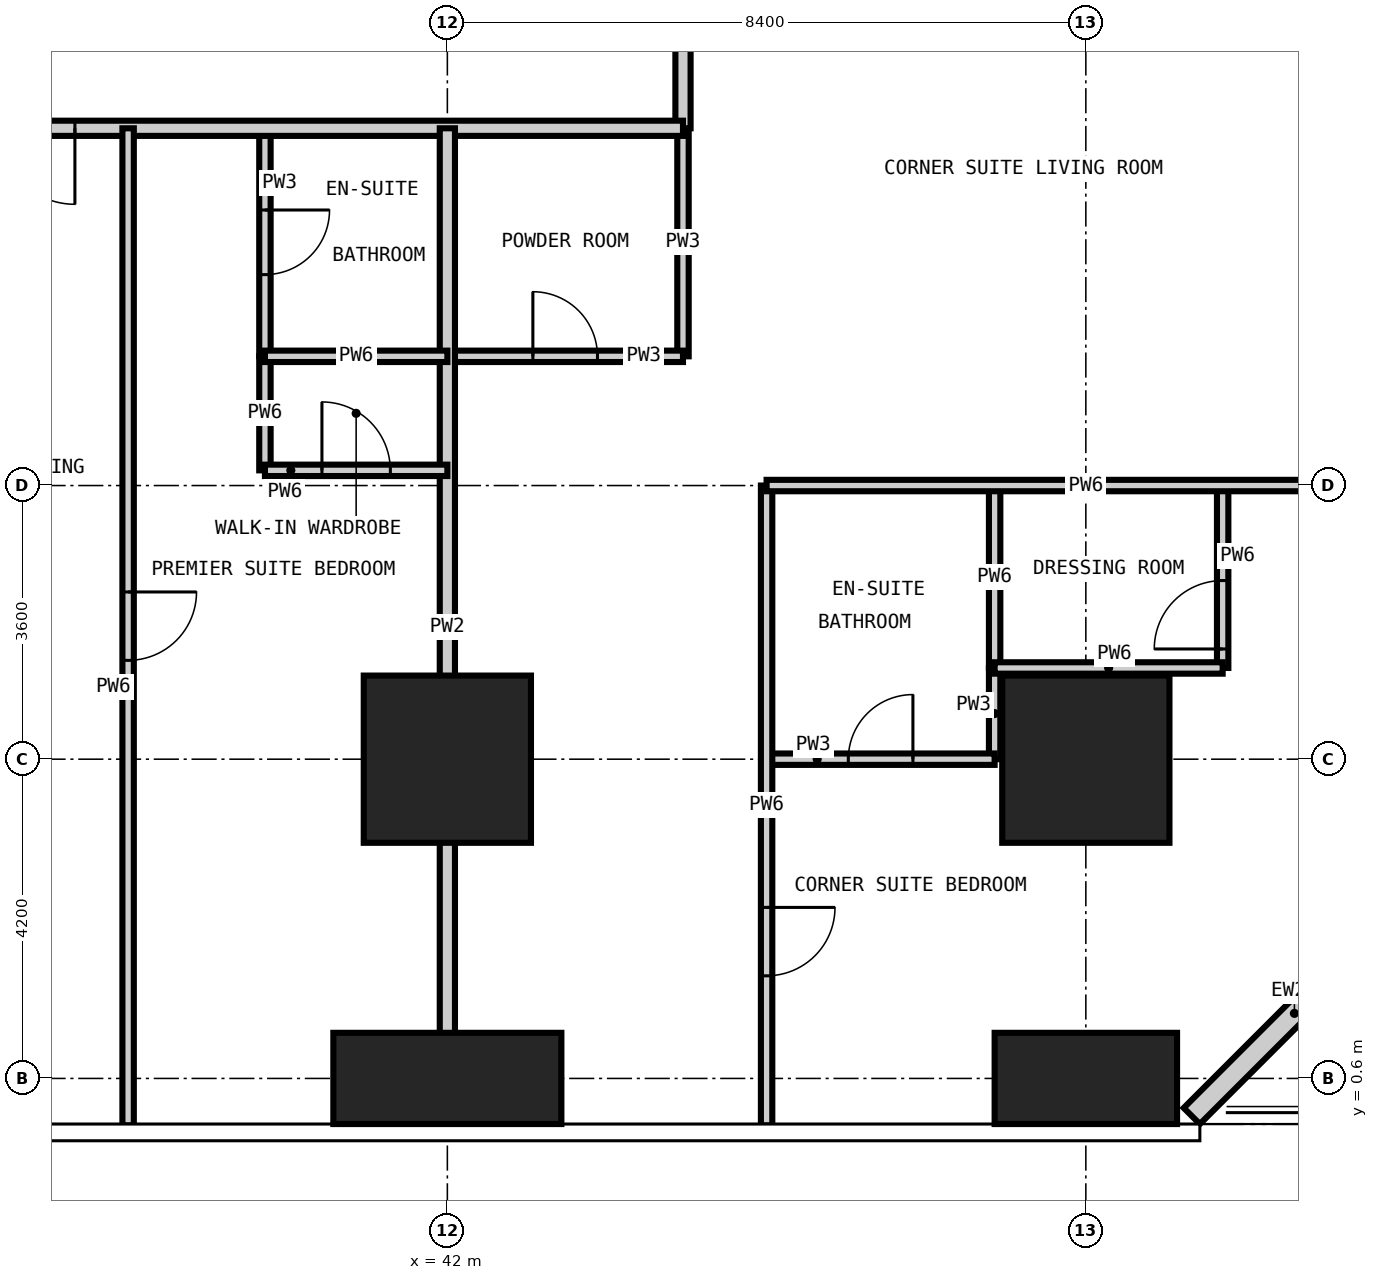
"""IFC4 building model, lengths in metres.
Left out: names, types, materials, properties, quantities, classifications, styles, units other than length and angle.
Written with IfcOpenShell. Run it as: python <this file> out.ifc"""

import sys

from ifc_helpers import new_model, si_unit, direction, frame, frame_2d, origin, origin_2d, place, context, subcontext, project, spatial, rectangle, extrude, element, fill, save


model = new_model("IFC4")
c1 = context("Model", 3, precision=1e-05, world=origin(), true_north=direction((0.0, 1.0)))
c2 = subcontext(c1, "Body", "Model", "MODEL_VIEW")
j1 = project(units=[si_unit("LENGTHUNIT", "METRE"), si_unit("PLANEANGLEUNIT", "RADIAN")], contexts=[c1])
p1 = place(None, origin())
s1 = spatial("IfcSite", under=j1, at=p1, CompositionType="ELEMENT")
p2 = place(p1, origin())
s2 = spatial("IfcBuilding", under=s1, at=p2, CompositionType="ELEMENT")
p3 = place(p2, frame((0.0, 0.0, 93.6)))
s3 = spatial("IfcBuildingStorey", under=s2, at=p3, CompositionType="ELEMENT", Elevation=93.6)
p4 = place(p3, frame((42.0, 0.6, -0.35), z_axis=(0.0, 0.0, 1.0), x_axis=(1.0, 0.0, 0.0)))
e1 = element("IfcColumn", 1, at=p4, inside=s3, PredefinedType="COLUMN", context=c2, shape_type="SweptSolid", body=[
    extrude(rectangle(XDim=3.0, YDim=1.2, at=origin_2d()), origin(), (0.0, 0.0, 1.0), 3.6),
])
p5 = place(p3, frame((42.0, 4.8, -0.35), z_axis=(0.0, 0.0, 1.0), x_axis=(1.0, 0.0, 0.0)))
e2 = element("IfcColumn", 2, at=p5, inside=s3, PredefinedType="COLUMN", context=c2, shape_type="SweptSolid", body=[
    extrude(rectangle(XDim=2.2, YDim=2.2, at=origin_2d()), origin(), (0.0, 0.0, 1.0), 3.6),
])
p6 = place(p3, frame((50.4, 0.6, -0.35), z_axis=(0.0, 0.0, 1.0), x_axis=(1.0, 0.0, 0.0)))
e3 = element("IfcColumn", 3, at=p6, inside=s3, PredefinedType="COLUMN", context=c2, shape_type="SweptSolid", body=[
    extrude(rectangle(XDim=2.4, YDim=1.2, at=origin_2d()), origin(), (0.0, 0.0, 1.0), 3.6),
])
p7 = place(p3, frame((50.4, 4.8, -0.35), z_axis=(0.0, 0.0, 1.0), x_axis=(1.0, 0.0, 0.0)))
e4 = element("IfcColumn", 4, at=p7, inside=s3, PredefinedType="COLUMN", context=c2, shape_type="SweptSolid", body=[
    extrude(rectangle(XDim=2.2, YDim=2.2, at=origin_2d()), origin(), (0.0, 0.0, 1.0), 3.6),
])
p8 = place(p3, frame((51.794, 0.106, 0.0), z_axis=(0.0, 0.0, 1.0), x_axis=(0.707106781187, 0.707106781187, 0.0)))
e5 = element("IfcWall", 5, at=p8, inside=s3, PredefinedType="SOLIDWALL", context=c2, shape_type="SweptSolid", body=[
    extrude(rectangle(XDim=3.818, YDim=0.3, at=frame_2d((1.909, 0.0))), origin(), (0.0, 0.0, 1.0), 3.25),
])
p9 = place(p3, frame((39.6, 10.1, 0.0), z_axis=(0.0, 0.0, 1.0), x_axis=(0.0, 1.0, 0.0)))
e6 = element("IfcWall", 6, at=p9, inside=s3, PredefinedType="PARTITIONING", context=c2, shape_type="SweptSolid", body=[
    extrude(rectangle(XDim=3.0, YDim=0.15, at=frame_2d((1.5, 0.0))), origin(), (0.0, 0.0, 1.0), 3.25),
])
p10 = place(p9, frame((1.075, 0.0, 0.0)))
e7 = element("IfcOpeningElement", 7, at=p10, cuts=e6, PredefinedType="OPENING", context=c2, shape_type="SweptSolid", body=[
    extrude(rectangle(XDim=0.85, YDim=2.1, at=frame_2d((0.425, 1.05))), frame((0.0, 0.085, 0.0), z_axis=(0.0, -1.0, 0.0), x_axis=(1.0, 0.0, 0.0)), (0.0, 0.0, 1.0), 0.17),
])
p11 = place(p3, frame((45.1, 10.1, 0.0), z_axis=(0.0, 0.0, 1.0), x_axis=(0.0, 1.0, 0.0)))
e8 = element("IfcWall", 8, at=p11, inside=s3, PredefinedType="PARTITIONING", context=c2, shape_type="SweptSolid", body=[
    extrude(rectangle(XDim=3.0, YDim=0.15, at=frame_2d((1.5, 0.0))), origin(), (0.0, 0.0, 1.0), 3.25),
])
p12 = place(p3, frame((49.2, 4.8, 0.0), z_axis=(0.0, 0.0, 1.0), x_axis=(0.0, 1.0, 0.0)))
e9 = element("IfcWall", 9, at=p12, inside=s3, PredefinedType="PARTITIONING", context=c2, shape_type="SweptSolid", body=[
    extrude(rectangle(XDim=1.2, YDim=0.15, at=frame_2d((0.6, 0.0))), origin(), (0.0, 0.0, 1.0), 3.25),
])
p13 = place(p3, frame((46.2, 4.8, 0.0), z_axis=(0.0, 0.0, 1.0), x_axis=(1.0, 0.0, 0.0)))
e10 = element("IfcWall", 10, at=p13, inside=s3, PredefinedType="PARTITIONING", context=c2, shape_type="SweptSolid", body=[
    extrude(rectangle(XDim=3.0, YDim=0.15, at=frame_2d((1.5, 0.0))), origin(), (0.0, 0.0, 1.0), 3.25),
])
p14 = place(p13, frame((1.075, 0.0, 0.0)))
e11 = element("IfcOpeningElement", 11, at=p14, cuts=e10, PredefinedType="OPENING", context=c2, shape_type="SweptSolid", body=[
    extrude(rectangle(XDim=0.85, YDim=2.1, at=frame_2d((0.425, 1.05))), frame((0.0, 0.085, 0.0), z_axis=(0.0, -1.0, 0.0), x_axis=(1.0, 0.0, 0.0)), (0.0, 0.0, 1.0), 0.17),
])
p15 = place(p3, frame((42.0, 10.1, 0.0), z_axis=(0.0, 0.0, 1.0), x_axis=(1.0, 0.0, 0.0)))
e12 = element("IfcWall", 12, at=p15, inside=s3, PredefinedType="PARTITIONING", context=c2, shape_type="SweptSolid", body=[
    extrude(rectangle(XDim=3.1, YDim=0.15, at=frame_2d((1.55, 0.0))), origin(), (0.0, 0.0, 1.0), 3.25),
])
p16 = place(p15, frame((1.125, 0.0, 0.0)))
e13 = element("IfcOpeningElement", 13, at=p16, cuts=e12, PredefinedType="OPENING", context=c2, shape_type="SweptSolid", body=[
    extrude(rectangle(XDim=0.85, YDim=2.1, at=frame_2d((0.425, 1.05))), frame((0.0, 0.085, 0.0), z_axis=(0.0, -1.0, 0.0), x_axis=(1.0, 0.0, 0.0)), (0.0, 0.0, 1.0), 0.17),
])
p17 = place(p3, frame((45.1, 44.5, 0.0), z_axis=(0.0, 0.0, 1.0), x_axis=(0.0, -1.0, 0.0)))
e14 = element("IfcWall", 14, at=p17, inside=s3, PredefinedType="PARTITIONING", context=c2, shape_type="SweptSolid", body=[
    extrude(rectangle(XDim=31.4, YDim=0.2, at=frame_2d((15.7, 0.0))), origin(), (0.0, 0.0, 1.0), 3.25),
])
p18 = place(p17, frame((21.65, 0.0, 0.0)))
e15 = element("IfcOpeningElement", 15, at=p18, cuts=e14, PredefinedType="OPENING", context=c2, shape_type="SweptSolid", body=[
    extrude(rectangle(XDim=1.0, YDim=2.2, at=frame_2d((0.5, 1.1))), frame((0.0, 0.11, 0.0), z_axis=(0.0, -1.0, 0.0), x_axis=(1.0, 0.0, 0.0)), (0.0, 0.0, 1.0), 0.22),
])
p19 = place(p17, frame((15.95, 0.0, 0.0)))
e16 = element("IfcOpeningElement", 16, at=p19, cuts=e14, PredefinedType="OPENING", context=c2, shape_type="SweptSolid", body=[
    extrude(rectangle(XDim=1.0, YDim=2.2, at=frame_2d((0.5, 1.1))), frame((0.0, 0.11, 0.0), z_axis=(0.0, -1.0, 0.0), x_axis=(1.0, 0.0, 0.0)), (0.0, 0.0, 1.0), 0.22),
])
p20 = place(p17, frame((4.85, 0.0, 0.0)))
e17 = element("IfcOpeningElement", 17, at=p20, cuts=e14, PredefinedType="OPENING", context=c2, shape_type="SweptSolid", body=[
    extrude(rectangle(XDim=1.0, YDim=2.2, at=frame_2d((0.5, 1.1))), frame((0.0, 0.11, 0.0), z_axis=(0.0, -1.0, 0.0), x_axis=(1.0, 0.0, 0.0)), (0.0, 0.0, 1.0), 0.22),
])
p21 = place(p17, frame((29.05, 0.0, 0.0)))
e18 = element("IfcOpeningElement", 18, at=p21, cuts=e14, PredefinedType="OPENING", context=c2, shape_type="SweptSolid", body=[
    extrude(rectangle(XDim=1.0, YDim=2.2, at=frame_2d((0.5, 1.1))), frame((0.0, 0.11, 0.0), z_axis=(0.0, -1.0, 0.0), x_axis=(1.0, 0.0, 0.0)), (0.0, 0.0, 1.0), 0.22),
])
p22 = place(p17, frame((0.75, 0.0, 0.0)))
e19 = element("IfcOpeningElement", 19, at=p22, cuts=e14, PredefinedType="OPENING", context=c2, shape_type="SweptSolid", body=[
    extrude(rectangle(XDim=1.0, YDim=2.2, at=frame_2d((0.5, 1.1))), frame((0.0, 0.11, 0.0), z_axis=(0.0, -1.0, 0.0), x_axis=(1.0, 0.0, 0.0)), (0.0, 0.0, 1.0), 0.22),
])
p23 = place(p3, frame((45.1, 13.1, 0.0), z_axis=(0.0, 0.0, 1.0), x_axis=(-1.0, 0.0, 0.0)))
e20 = element("IfcWall", 20, at=p23, inside=s3, PredefinedType="PARTITIONING", context=c2, shape_type="SweptSolid", body=[
    extrude(rectangle(XDim=32.5, YDim=0.2, at=frame_2d((16.25, 0.0))), origin(), (0.0, 0.0, 1.0), 3.25),
])
p24 = place(p23, frame((24.8, 0.0, 0.0)))
e21 = element("IfcOpeningElement", 21, at=p24, cuts=e20, PredefinedType="OPENING", context=c2, shape_type="SweptSolid", body=[
    extrude(rectangle(XDim=1.0, YDim=2.2, at=frame_2d((0.5, 1.1))), frame((0.0, 0.11, 0.0), z_axis=(0.0, -1.0, 0.0), x_axis=(1.0, 0.0, 0.0)), (0.0, 0.0, 1.0), 0.22),
])
p25 = place(p23, frame((14.0, 0.0, 0.0)))
e22 = element("IfcOpeningElement", 22, at=p25, cuts=e20, PredefinedType="OPENING", context=c2, shape_type="SweptSolid", body=[
    extrude(rectangle(XDim=1.0, YDim=2.2, at=frame_2d((0.5, 1.1))), frame((0.0, 0.11, 0.0), z_axis=(0.0, -1.0, 0.0), x_axis=(1.0, 0.0, 0.0)), (0.0, 0.0, 1.0), 0.22),
])
p26 = place(p23, frame((8.0, 0.0, 0.0)))
e23 = element("IfcOpeningElement", 23, at=p26, cuts=e20, PredefinedType="OPENING", context=c2, shape_type="SweptSolid", body=[
    extrude(rectangle(XDim=1.0, YDim=2.2, at=frame_2d((0.5, 1.1))), frame((0.0, 0.11, 0.0), z_axis=(0.0, -1.0, 0.0), x_axis=(1.0, 0.0, 0.0)), (0.0, 0.0, 1.0), 0.22),
])
p27 = place(p3, frame((42.0, -0.018, 0.0), z_axis=(0.0, 0.0, 1.0), x_axis=(0.0, 1.0, 0.0)))
e24 = element("IfcWall", 24, at=p27, inside=s3, PredefinedType="PARTITIONING", context=c2, shape_type="SweptSolid", body=[
    extrude(rectangle(XDim=13.118, YDim=0.2, at=frame_2d((6.559, 0.0))), origin(), (0.0, 0.0, 1.0), 3.25),
])
p28 = place(p3, frame((37.8, -0.018, 0.0), z_axis=(0.0, 0.0, 1.0), x_axis=(0.0, 1.0, 0.0)))
e25 = element("IfcWall", 25, at=p28, inside=s3, PredefinedType="PARTITIONING", context=c2, shape_type="SweptSolid", body=[
    extrude(rectangle(XDim=13.118, YDim=0.15, at=frame_2d((6.559, 0.0))), origin(), (0.0, 0.0, 1.0), 3.25),
])
p29 = place(p28, frame((6.118, 0.0, 0.0)))
e26 = element("IfcOpeningElement", 26, at=p29, cuts=e25, PredefinedType="OPENING", context=c2, shape_type="SweptSolid", body=[
    extrude(rectangle(XDim=0.9, YDim=2.1, at=frame_2d((0.45, 1.05))), frame((0.0, 0.085, 0.0), z_axis=(0.0, -1.0, 0.0), x_axis=(1.0, 0.0, 0.0)), (0.0, 0.0, 1.0), 0.17),
])
p30 = place(p3, frame((39.6, 8.6, 0.0), z_axis=(0.0, 0.0, 1.0), x_axis=(0.0, 1.0, 0.0)))
e27 = element("IfcWall", 27, at=p30, inside=s3, PredefinedType="PARTITIONING", context=c2, shape_type="SweptSolid", body=[
    extrude(rectangle(XDim=1.5, YDim=0.15, at=frame_2d((0.75, 0.0))), origin(), (0.0, 0.0, 1.0), 3.25),
])
p31 = place(p3, frame((46.2, -0.018, 0.0), z_axis=(0.0, 0.0, 1.0), x_axis=(0.0, 1.0, 0.0)))
e28 = element("IfcWall", 28, at=p31, inside=s3, PredefinedType="PARTITIONING", context=c2, shape_type="SweptSolid", body=[
    extrude(rectangle(XDim=8.418, YDim=0.15, at=frame_2d((4.209, 0.0))), origin(), (0.0, 0.0, 1.0), 3.25),
])
p32 = place(p31, frame((1.968, 0.0, 0.0)))
e29 = element("IfcOpeningElement", 29, at=p32, cuts=e28, PredefinedType="OPENING", context=c2, shape_type="SweptSolid", body=[
    extrude(rectangle(XDim=0.9, YDim=2.1, at=frame_2d((0.45, 1.05))), frame((0.0, 0.085, 0.0), z_axis=(0.0, -1.0, 0.0), x_axis=(1.0, 0.0, 0.0)), (0.0, 0.0, 1.0), 0.17),
])
p33 = place(p3, frame((49.2, 6.0, 0.0), z_axis=(0.0, 0.0, 1.0), x_axis=(0.0, 1.0, 0.0)))
e30 = element("IfcWall", 30, at=p33, inside=s3, PredefinedType="PARTITIONING", context=c2, shape_type="SweptSolid", body=[
    extrude(rectangle(XDim=2.4, YDim=0.15, at=frame_2d((1.2, 0.0))), origin(), (0.0, 0.0, 1.0), 3.25),
])
p34 = place(p3, frame((52.2, 6.0, 0.0), z_axis=(0.0, 0.0, 1.0), x_axis=(0.0, 1.0, 0.0)))
e31 = element("IfcWall", 31, at=p34, inside=s3, PredefinedType="PARTITIONING", context=c2, shape_type="SweptSolid", body=[
    extrude(rectangle(XDim=2.4, YDim=0.15, at=frame_2d((1.2, 0.0))), origin(), (0.0, 0.0, 1.0), 3.25),
])
p35 = place(p34, frame((0.25, 0.0, 0.0)))
e32 = element("IfcOpeningElement", 32, at=p35, cuts=e31, PredefinedType="OPENING", context=c2, shape_type="SweptSolid", body=[
    extrude(rectangle(XDim=0.9, YDim=2.1, at=frame_2d((0.45, 1.05))), frame((0.0, 0.085, 0.0), z_axis=(0.0, -1.0, 0.0), x_axis=(1.0, 0.0, 0.0)), (0.0, 0.0, 1.0), 0.17),
])
p36 = place(p3, frame((49.2, 6.0, 0.0), z_axis=(0.0, 0.0, 1.0), x_axis=(1.0, 0.0, 0.0)))
e33 = element("IfcWall", 33, at=p36, inside=s3, PredefinedType="PARTITIONING", context=c2, shape_type="SweptSolid", body=[
    extrude(rectangle(XDim=3.0, YDim=0.15, at=frame_2d((1.5, 0.0))), origin(), (0.0, 0.0, 1.0), 3.25),
])
p37 = place(p3, frame((46.2, 8.4, 0.0), z_axis=(0.0, 0.0, 1.0), x_axis=(1.0, 0.0, 0.0)))
e34 = element("IfcWall", 34, at=p37, inside=s3, PredefinedType="PARTITIONING", context=c2, shape_type="SweptSolid", body=[
    extrude(rectangle(XDim=8.4, YDim=0.15, at=frame_2d((4.2, 0.0))), origin(), (0.0, 0.0, 1.0), 3.25),
])
p38 = place(p3, frame((39.6, 8.6, 0.0), z_axis=(0.0, 0.0, 1.0), x_axis=(1.0, 0.0, 0.0)))
e35 = element("IfcWall", 35, at=p38, inside=s3, PredefinedType="PARTITIONING", context=c2, shape_type="SweptSolid", body=[
    extrude(rectangle(XDim=2.4, YDim=0.15, at=frame_2d((1.2, 0.0))), origin(), (0.0, 0.0, 1.0), 3.25),
])
p39 = place(p38, frame((0.75, 0.0, 0.0)))
e36 = element("IfcOpeningElement", 36, at=p39, cuts=e35, PredefinedType="OPENING", context=c2, shape_type="SweptSolid", body=[
    extrude(rectangle(XDim=0.9, YDim=2.1, at=frame_2d((0.45, 1.05))), frame((0.0, 0.085, 0.0), z_axis=(0.0, -1.0, 0.0), x_axis=(1.0, 0.0, 0.0)), (0.0, 0.0, 1.0), 0.17),
])
p40 = place(p3, frame((39.6, 10.1, 0.0), z_axis=(0.0, 0.0, 1.0), x_axis=(1.0, 0.0, 0.0)))
e37 = element("IfcWall", 37, at=p40, inside=s3, PredefinedType="PARTITIONING", context=c2, shape_type="SweptSolid", body=[
    extrude(rectangle(XDim=2.4, YDim=0.15, at=frame_2d((1.2, 0.0))), origin(), (0.0, 0.0, 1.0), 3.25),
])
p41 = place(p26, origin())
e38 = element("IfcDoor", 38, at=p41, inside=s3, OperationType="SINGLE_SWING_LEFT", PredefinedType="DOOR", context=c2, shape_type="SweptSolid", body=[
    extrude(rectangle(XDim=1.0, YDim=2.2, at=frame_2d((0.5, 1.1))), frame((0.0, 0.025, 0.0), z_axis=(0.0, -1.0, 0.0), x_axis=(1.0, 0.0, 0.0)), (0.0, 0.0, 1.0), 0.05),
])
fill(e23, e38)
p42 = place(p29, frame((0.9, 0.0, 0.0), z_axis=(0.0, 0.0, 1.0), x_axis=(-1.0, 0.0, 0.0)))
e39 = element("IfcDoor", 39, at=p42, inside=s3, OperationType="SINGLE_SWING_LEFT", PredefinedType="DOOR", context=c2, shape_type="SweptSolid", body=[
    extrude(rectangle(XDim=0.9, YDim=2.1, at=frame_2d((0.45, 1.05))), frame((0.0, 0.025, 0.0), z_axis=(0.0, -1.0, 0.0), x_axis=(1.0, 0.0, 0.0)), (0.0, 0.0, 1.0), 0.05),
])
fill(e26, e39)
p43 = place(p10, frame((0.85, 0.0, 0.0), z_axis=(0.0, 0.0, 1.0), x_axis=(-1.0, 0.0, 0.0)))
e40 = element("IfcDoor", 40, at=p43, inside=s3, OperationType="SINGLE_SWING_LEFT", PredefinedType="DOOR", context=c2, shape_type="SweptSolid", body=[
    extrude(rectangle(XDim=0.85, YDim=2.1, at=frame_2d((0.425, 1.05))), frame((0.0, 0.025, 0.0), z_axis=(0.0, -1.0, 0.0), x_axis=(1.0, 0.0, 0.0)), (0.0, 0.0, 1.0), 0.05),
])
fill(e7, e40)
p44 = place(p39, origin())
e41 = element("IfcDoor", 41, at=p44, inside=s3, OperationType="SINGLE_SWING_LEFT", PredefinedType="DOOR", context=c2, shape_type="SweptSolid", body=[
    extrude(rectangle(XDim=0.9, YDim=2.1, at=frame_2d((0.45, 1.05))), frame((0.0, 0.025, 0.0), z_axis=(0.0, -1.0, 0.0), x_axis=(1.0, 0.0, 0.0)), (0.0, 0.0, 1.0), 0.05),
])
fill(e36, e41)
p45 = place(p16, origin())
e42 = element("IfcDoor", 42, at=p45, inside=s3, OperationType="SINGLE_SWING_LEFT", PredefinedType="DOOR", context=c2, shape_type="SweptSolid", body=[
    extrude(rectangle(XDim=0.85, YDim=2.1, at=frame_2d((0.425, 1.05))), frame((0.0, 0.025, 0.0), z_axis=(0.0, -1.0, 0.0), x_axis=(1.0, 0.0, 0.0)), (0.0, 0.0, 1.0), 0.05),
])
fill(e13, e42)
p46 = place(p32, frame((0.9, 0.0, 0.0), z_axis=(0.0, 0.0, 1.0), x_axis=(-1.0, 0.0, 0.0)))
e43 = element("IfcDoor", 43, at=p46, inside=s3, OperationType="SINGLE_SWING_LEFT", PredefinedType="DOOR", context=c2, shape_type="SweptSolid", body=[
    extrude(rectangle(XDim=0.9, YDim=2.1, at=frame_2d((0.45, 1.05))), frame((0.0, 0.025, 0.0), z_axis=(0.0, -1.0, 0.0), x_axis=(1.0, 0.0, 0.0)), (0.0, 0.0, 1.0), 0.05),
])
fill(e29, e43)
p47 = place(p14, origin())
e44 = element("IfcDoor", 44, at=p47, inside=s3, OperationType="SINGLE_SWING_RIGHT", PredefinedType="DOOR", context=c2, shape_type="SweptSolid", body=[
    extrude(rectangle(XDim=0.85, YDim=2.1, at=frame_2d((0.425, 1.05))), frame((0.0, 0.025, 0.0), z_axis=(0.0, -1.0, 0.0), x_axis=(1.0, 0.0, 0.0)), (0.0, 0.0, 1.0), 0.05),
])
fill(e11, e44)
p48 = place(p35, origin())
e45 = element("IfcDoor", 45, at=p48, inside=s3, OperationType="SINGLE_SWING_LEFT", PredefinedType="DOOR", context=c2, shape_type="SweptSolid", body=[
    extrude(rectangle(XDim=0.9, YDim=2.1, at=frame_2d((0.45, 1.05))), frame((0.0, 0.025, 0.0), z_axis=(0.0, -1.0, 0.0), x_axis=(1.0, 0.0, 0.0)), (0.0, 0.0, 1.0), 0.05),
])
fill(e32, e45)
save(model, sys.argv[1])
